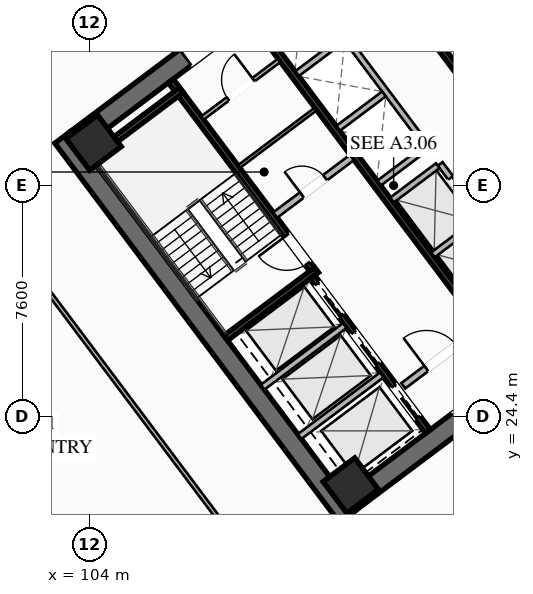
"""IFC4 building model, lengths in metres.
Left out: names, types, materials, properties, quantities, classifications, styles, units other than length and angle.
Written with IfcOpenShell. Run it as: python <this file> out.ifc"""

import sys

from ifc_helpers import new_model, si_unit, direction, frame, frame_2d, origin, origin_2d, place, context, subcontext, project, spatial, rectangle, hollow_rectangle, extrude, element, fill, save


model = new_model("IFC4")
c1 = context("Model", 3, precision=1e-05, world=origin(), true_north=direction((0.0, 1.0)))
c2 = subcontext(c1, "Body", "Model", "MODEL_VIEW")
j1 = project(units=[si_unit("LENGTHUNIT", "METRE"), si_unit("PLANEANGLEUNIT", "RADIAN")], contexts=[c1])
p1 = place(None, origin())
s1 = spatial("IfcSite", under=j1, at=p1, CompositionType="ELEMENT")
p2 = place(p1, origin())
s2 = spatial("IfcBuilding", under=s1, at=p2, CompositionType="ELEMENT")
p3 = place(p2, frame((0.0, 0.0, 70.75)))
s3 = spatial("IfcBuildingStorey", under=s2, at=p3, CompositionType="ELEMENT", Elevation=70.75)
for number, where, z_axis, x_axis in (
    (1, (112.476, 21.107, 0.0), (0.0, 0.0, 1.0), (-0.6, 0.8, 0.0)),
    (2, (115.524, 42.893, 0.0), (0.0, 0.0, 1.0), (0.6, -0.8, 0.0)),
):
    element("IfcWall", number, at=place(p3, frame(where, z_axis=z_axis, x_axis=x_axis)), inside=s3, PredefinedType="SHEAR", context=c2, shape_type="SweptSolid", body=[
        extrude(rectangle(XDim=15.6, YDim=0.65, at=frame_2d((7.8, 0.0))), origin(), (0.0, 0.0, 1.0), 3.55),
    ])
p4 = place(p3, frame((124.429, 30.478, 0.0), z_axis=(0.0, 0.0, 1.0), x_axis=(-0.799998028465, -0.600002628705, 0.0)))
e3 = element("IfcWall", 3, at=p4, inside=s3, PredefinedType="SHEAR", context=c2, shape_type="SweptSolid", body=[
    extrude(rectangle(XDim=14.86, YDim=0.65, at=frame_2d((7.43, 0.0))), origin(), (0.0, 0.0, 1.0), 3.55),
])
p5 = place(p4, frame((9.13, 0.0, 0.0)))
e4 = element("IfcOpeningElement", 4, at=p5, cuts=e3, PredefinedType="OPENING", context=c2, shape_type="SweptSolid", body=[
    extrude(rectangle(XDim=1.25, YDim=2.25, at=frame_2d((0.625, 1.125))), frame((0.0, 0.335, 0.0), z_axis=(0.0, -1.0, 0.0), x_axis=(1.0, 0.0, 0.0)), (0.0, 0.0, 1.0), 0.67),
])
p6 = place(p4, frame((4.08, 0.0, 0.0)))
e5 = element("IfcOpeningElement", 5, at=p6, cuts=e3, PredefinedType="OPENING", context=c2, shape_type="SweptSolid", body=[
    extrude(rectangle(XDim=1.25, YDim=2.25, at=frame_2d((0.625, 1.125))), frame((0.0, 0.335, 0.0), z_axis=(0.0, -1.0, 0.0), x_axis=(1.0, 0.0, 0.0)), (0.0, 0.0, 1.0), 0.67),
])
p7 = place(p3, frame((103.571, 33.522, 0.0), z_axis=(0.0, 0.0, 1.0), x_axis=(0.799998028465, 0.600002628705, 0.0)))
e6 = element("IfcWall", 6, at=p7, inside=s3, PredefinedType="SHEAR", context=c2, shape_type="SweptSolid", body=[
    extrude(rectangle(XDim=14.86, YDim=0.65, at=frame_2d((7.43, 0.0))), origin(), (0.0, 0.0, 1.0), 3.55),
])
p8 = place(p7, frame((4.48, 0.0, 0.0)))
e7 = element("IfcOpeningElement", 7, at=p8, cuts=e6, PredefinedType="OPENING", context=c2, shape_type="SweptSolid", body=[
    extrude(rectangle(XDim=1.25, YDim=2.25, at=frame_2d((0.625, 1.125))), frame((0.0, 0.335, 0.0), z_axis=(0.0, -1.0, 0.0), x_axis=(1.0, 0.0, 0.0)), (0.0, 0.0, 1.0), 0.67),
])
p9 = place(p7, frame((9.53, 0.0, 0.0)))
e8 = element("IfcOpeningElement", 8, at=p9, cuts=e6, PredefinedType="OPENING", context=c2, shape_type="SweptSolid", body=[
    extrude(rectangle(XDim=1.25, YDim=2.25, at=frame_2d((0.625, 1.125))), frame((0.0, 0.335, 0.0), z_axis=(0.0, -1.0, 0.0), x_axis=(1.0, 0.0, 0.0)), (0.0, 0.0, 1.0), 0.67),
])
for number, where, z_axis, x_axis in (
    (9, (112.59, 22.13, 0.0), (0.0, 0.0, 1.0), (0.8, 0.6, 0.0)),
    (10, (104.13, 33.41, 0.0), (0.0, 0.0, 1.0), (0.8, 0.6, 0.0)),
):
    element("IfcColumn", number, at=place(p3, frame(where, z_axis=z_axis, x_axis=x_axis)), inside=s3, PredefinedType="COLUMN", context=c2, shape_type="SweptSolid", body=[
        extrude(hollow_rectangle(XDim=1.3, YDim=1.3, WallThickness=0.05, at=origin_2d()), origin(), (0.0, 0.0, 1.0), 3.35),
    ])
p10 = place(p3, frame((111.44, 29.08, 0.0), z_axis=(0.0, 0.0, 1.0), x_axis=(-0.600009827119, 0.799992629566, 0.0)))
e11 = element("IfcWall", 11, at=p10, inside=s3, PredefinedType="SHEAR", context=c2, shape_type="SweptSolid", body=[
    extrude(rectangle(XDim=7.95, YDim=0.2, at=frame_2d((3.975, 0.0))), origin(), (0.0, 0.0, 1.0), 3.35),
])
p11 = place(p10, frame((0.45, 0.0, 0.0)))
e12 = element("IfcOpeningElement", 12, at=p11, cuts=e11, PredefinedType="OPENING", context=c2, shape_type="SweptSolid", body=[
    extrude(rectangle(XDim=1.15, YDim=2.2, at=frame_2d((0.575, 1.1))), frame((0.0, 0.11, 0.0), z_axis=(0.0, -1.0, 0.0), x_axis=(1.0, 0.0, 0.0)), (0.0, 0.0, 1.0), 0.22),
])
for number, where, z_axis, x_axis in (
    (13, (108.476, 26.982, 0.0), (0.0, 0.0, 1.0), (0.8, 0.6, 0.0)),
    (14, (104.036, 32.902, 0.0), (0.0, 0.0, 1.0), (0.8, 0.6, 0.0)),
):
    element("IfcWall", number, at=place(p3, frame(where, z_axis=z_axis, x_axis=x_axis)), inside=s3, PredefinedType="SHEAR", context=c2, shape_type="SweptSolid", body=[
        extrude(rectangle(XDim=3.73, YDim=0.2, at=frame_2d((1.865, 0.0))), origin(), (0.0, 0.0, 1.0), 3.35),
    ])
p12 = place(p3, frame((117.938, 26.016, 0.0), z_axis=(0.0, 0.0, 1.0), x_axis=(-0.600005463273, 0.799995902516, 0.0)))
e15 = element("IfcWall", 15, at=p12, inside=s3, PredefinedType="SHEAR", context=c2, shape_type="SweptSolid", body=[
    extrude(rectangle(XDim=14.3, YDim=0.2, at=frame_2d((7.15, 0.0))), origin(), (0.0, 0.0, 1.0), 3.35),
])
p13 = place(p3, frame((110.104, 31.028, 0.0), z_axis=(0.0, 0.0, 1.0), x_axis=(0.800018601094, 0.59997519774, 0.0)))
e16 = element("IfcWall", 16, at=p13, inside=s3, PredefinedType="SOLIDWALL", context=c2, shape_type="SweptSolid", body=[
    extrude(rectangle(XDim=3.15, YDim=0.22, at=frame_2d((1.575, 0.0))), origin(), (0.0, 0.0, 1.0), 2.703),
])
p14 = place(p13, frame((1.1, 0.0, 0.0)))
e17 = element("IfcOpeningElement", 17, at=p14, cuts=e16, PredefinedType="OPENING", context=c2, shape_type="SweptSolid", body=[
    extrude(rectangle(XDim=0.95, YDim=2.05, at=frame_2d((0.475, 1.025))), frame((0.0, 0.12, 0.0), z_axis=(0.0, -1.0, 0.0), x_axis=(1.0, 0.0, 0.0)), (0.0, 0.0, 1.0), 0.24),
])
p15 = place(p3, frame((114.316, 25.412, 0.0), z_axis=(0.0, 0.0, 1.0), x_axis=(0.800018601094, 0.59997519774, 0.0)))
e18 = element("IfcWall", 18, at=p15, inside=s3, PredefinedType="SOLIDWALL", context=c2, shape_type="SweptSolid", body=[
    extrude(rectangle(XDim=3.15, YDim=0.22, at=frame_2d((1.575, 0.0))), origin(), (0.0, 0.0, 1.0), 2.703),
])
p16 = place(p15, frame((0.95, 0.0, 0.0)))
e19 = element("IfcOpeningElement", 19, at=p16, cuts=e18, PredefinedType="OPENING", context=c2, shape_type="SweptSolid", body=[
    extrude(rectangle(XDim=1.25, YDim=2.25, at=frame_2d((0.625, 1.125))), frame((0.0, 0.12, 0.0), z_axis=(0.0, -1.0, 0.0), x_axis=(1.0, 0.0, 0.0)), (0.0, 0.0, 1.0), 0.24),
])
p17 = place(p3, frame((115.13, 23.91, 0.0), z_axis=(0.0, 0.0, 1.0), x_axis=(-0.599975393228, 0.800018454488, 0.0)))
e20 = element("IfcWall", 20, at=p17, inside=s3, PredefinedType="SHEAR", context=c2, shape_type="SweptSolid", body=[
    extrude(rectangle(XDim=6.35, YDim=0.2, at=frame_2d((3.175, 0.0))), origin(), (0.0, 0.0, 1.0), 3.35),
])
p18 = place(p17, frame((4.775, 0.0, 0.0)))
e21 = element("IfcOpeningElement", 21, at=p18, cuts=e20, PredefinedType="OPENING", context=c2, shape_type="SweptSolid", body=[
    extrude(rectangle(XDim=1.3, YDim=2.25, at=frame_2d((0.65, 1.125))), frame((0.0, 0.11, 0.0), z_axis=(0.0, -1.0, 0.0), x_axis=(1.0, 0.0, 0.0)), (0.0, 0.0, 1.0), 0.22),
])
p19 = place(p17, frame((2.775, 0.0, 0.0)))
e22 = element("IfcOpeningElement", 22, at=p19, cuts=e20, PredefinedType="OPENING", context=c2, shape_type="SweptSolid", body=[
    extrude(rectangle(XDim=1.3, YDim=2.25, at=frame_2d((0.65, 1.125))), frame((0.0, 0.11, 0.0), z_axis=(0.0, -1.0, 0.0), x_axis=(1.0, 0.0, 0.0)), (0.0, 0.0, 1.0), 0.22),
])
p20 = place(p17, frame((0.575, 0.0, 0.0)))
e23 = element("IfcOpeningElement", 23, at=p20, cuts=e20, PredefinedType="OPENING", context=c2, shape_type="SweptSolid", body=[
    extrude(rectangle(XDim=1.3, YDim=2.25, at=frame_2d((0.65, 1.125))), frame((0.0, 0.11, 0.0), z_axis=(0.0, -1.0, 0.0), x_axis=(1.0, 0.0, 0.0)), (0.0, 0.0, 1.0), 0.22),
])
for number, where, z_axis, x_axis in (
    (24, (110.906, 23.742, 0.0), (0.0, 0.0, 1.0), (0.8, 0.6, 0.0)),
    (25, (109.688, 25.366, 0.0), (0.0, 0.0, 1.0), (0.8, 0.6, 0.0)),
):
    element("IfcWall", number, at=place(p3, frame(where, z_axis=z_axis, x_axis=x_axis)), inside=s3, PredefinedType="SOLIDWALL", context=c2, shape_type="SweptSolid", body=[
        extrude(rectangle(XDim=3.38, YDim=0.2, at=frame_2d((1.69, 0.0))), origin(), (0.0, 0.0, 1.0), 3.35),
    ])
p21 = place(p3, frame((112.87, 40.09, 0.0), z_axis=(0.0, 0.0, 1.0), x_axis=(0.599975393228, -0.800018454488, 0.0)))
e26 = element("IfcWall", 26, at=p21, inside=s3, PredefinedType="SHEAR", context=c2, shape_type="SweptSolid", body=[
    extrude(rectangle(XDim=6.35, YDim=0.2, at=frame_2d((3.175, 0.0))), origin(), (0.0, 0.0, 1.0), 3.35),
])
p22 = place(p3, frame((107.71, 34.22, 0.0), z_axis=(0.0, 0.0, 1.0), x_axis=(0.799981399002, 0.60002480053, 0.0)))
e27 = element("IfcWall", 27, at=p22, inside=s3, PredefinedType="PARTITIONING", context=c2, shape_type="SweptSolid", body=[
    extrude(rectangle(XDim=3.15, YDim=0.135, at=frame_2d((1.575, 0.0))), origin(), (0.0, 0.0, 1.0), 2.703),
])
p23 = place(p22, frame((1.05, 0.0, 0.0)))
e28 = element("IfcOpeningElement", 28, at=p23, cuts=e27, PredefinedType="OPENING", context=c2, shape_type="SweptSolid", body=[
    extrude(rectangle(XDim=1.05, YDim=2.2, at=frame_2d((0.525, 1.1))), frame((0.0, 0.077, 0.0), z_axis=(0.0, -1.0, 0.0), x_axis=(1.0, 0.0, 0.0)), (0.0, 0.0, 1.0), 0.155),
])
p24 = place(p3, frame((108.91, 32.62, 0.0), z_axis=(0.0, 0.0, 1.0), x_axis=(0.800018601094, 0.59997519774, 0.0)))
e29 = element("IfcWall", 29, at=p24, inside=s3, PredefinedType="PARTITIONING", context=c2, shape_type="SweptSolid", body=[
    extrude(rectangle(XDim=3.15, YDim=0.11, at=frame_2d((1.575, 0.0))), origin(), (0.0, 0.0, 1.0), 2.703),
])
p25 = place(p3, frame((119.61, 27.27, 0.0), z_axis=(0.0, 0.0, 1.0), x_axis=(-0.600011488909, 0.79999138319, 0.0)))
e30 = element("IfcWall", 30, at=p25, inside=s3, PredefinedType="SOLIDWALL", context=c2, shape_type="SweptSolid", body=[
    extrude(rectangle(XDim=6.8, YDim=0.2, at=frame_2d((3.4, 0.0))), origin(), (0.0, 0.0, 1.0), 3.35),
])
p26 = place(p25, frame((0.625, 0.0, 0.0)))
e31 = element("IfcOpeningElement", 31, at=p26, cuts=e30, PredefinedType="OPENING", context=c2, shape_type="SweptSolid", body=[
    extrude(rectangle(XDim=1.1, YDim=2.2, at=frame_2d((0.55, 1.1))), frame((0.0, 0.11, 0.0), z_axis=(0.0, -1.0, 0.0), x_axis=(1.0, 0.0, 0.0)), (0.0, 0.0, 1.0), 0.22),
])
p27 = place(p25, frame((2.875, 0.0, 0.0)))
e32 = element("IfcOpeningElement", 32, at=p27, cuts=e30, PredefinedType="OPENING", context=c2, shape_type="SweptSolid", body=[
    extrude(rectangle(XDim=1.1, YDim=2.2, at=frame_2d((0.55, 1.1))), frame((0.0, 0.11, 0.0), z_axis=(0.0, -1.0, 0.0), x_axis=(1.0, 0.0, 0.0)), (0.0, 0.0, 1.0), 0.22),
])
p28 = place(p25, frame((5.125, 0.0, 0.0)))
e33 = element("IfcOpeningElement", 33, at=p28, cuts=e30, PredefinedType="OPENING", context=c2, shape_type="SweptSolid", body=[
    extrude(rectangle(XDim=1.1, YDim=2.2, at=frame_2d((0.55, 1.1))), frame((0.0, 0.11, 0.0), z_axis=(0.0, -1.0, 0.0), x_axis=(1.0, 0.0, 0.0)), (0.0, 0.0, 1.0), 0.22),
])
p29 = place(p3, frame((115.296, 29.722, 0.0), z_axis=(0.0, 0.0, 1.0), x_axis=(0.799984418148, 0.600020775241, 0.0)))
e34 = element("IfcWall", 34, at=p29, inside=s3, PredefinedType="SOLIDWALL", context=c2, shape_type="SweptSolid", body=[
    extrude(rectangle(XDim=1.88, YDim=0.2, at=frame_2d((0.94, 0.0))), origin(), (0.0, 0.0, 1.0), 3.35),
])
p30 = place(p3, frame((113.946, 31.522, 0.0), z_axis=(0.0, 0.0, 1.0), x_axis=(0.8, 0.6, 0.0)))
e35 = element("IfcWall", 35, at=p30, inside=s3, PredefinedType="SOLIDWALL", context=c2, shape_type="SweptSolid", body=[
    extrude(rectangle(XDim=1.88, YDim=0.2, at=frame_2d((0.94, 0.0))), origin(), (0.0, 0.0, 1.0), 3.35),
])
p31 = place(p3, frame((115.11, 33.27, 0.0), z_axis=(0.0, 0.0, 1.0), x_axis=(-0.600011488909, 0.79999138319, 0.0)))
e36 = element("IfcWall", 36, at=p31, inside=s3, PredefinedType="SOLIDWALL", context=c2, shape_type="SweptSolid", body=[
    extrude(rectangle(XDim=6.8, YDim=0.2, at=frame_2d((3.4, 0.0))), origin(), (0.0, 0.0, 1.0), 3.35),
])
p32 = place(p3, frame((113.526, 32.082, 0.0), z_axis=(0.0, 0.0, 1.0), x_axis=(0.800046745961, 0.599937666993, 0.0)))
e37 = element("IfcWall", 37, at=p32, inside=s3, PredefinedType="SOLIDWALL", context=c2, shape_type="SweptSolid", body=[
    extrude(rectangle(XDim=1.88, YDim=0.2, at=frame_2d((0.94, 0.0))), origin(), (0.0, 0.0, 1.0), 3.35),
])
p33 = place(p3, frame((112.176, 33.882, 0.0), z_axis=(0.0, 0.0, 1.0), x_axis=(0.8, 0.6, 0.0)))
e38 = element("IfcWall", 38, at=p33, inside=s3, PredefinedType="SOLIDWALL", context=c2, shape_type="SweptSolid", body=[
    extrude(rectangle(XDim=1.88, YDim=0.2, at=frame_2d((0.94, 0.0))), origin(), (0.0, 0.0, 1.0), 3.35),
])
p34 = place(p3, frame((110.826, 35.682, 0.0), z_axis=(0.0, 0.0, 1.0), x_axis=(0.799984418148, 0.600020775241, 0.0)))
e39 = element("IfcWall", 39, at=p34, inside=s3, PredefinedType="SOLIDWALL", context=c2, shape_type="SweptSolid", body=[
    extrude(rectangle(XDim=1.88, YDim=0.2, at=frame_2d((0.94, 0.0))), origin(), (0.0, 0.0, 1.0), 3.35),
])
p35 = place(p3, frame((98.516, 34.012, 0.0), z_axis=(0.0, 0.0, 1.0), x_axis=(0.8, 0.6, 0.0)))
e40 = element("IfcWall", 40, at=p35, inside=s3, PredefinedType="PARTITIONING", context=c2, shape_type="SweptSolid", body=[
    extrude(rectangle(XDim=28.23, YDim=0.135, at=frame_2d((14.115, 0.0))), origin(), (0.0, 0.0, 1.0), 2.703),
])
p36 = place(p35, frame((0.3, 0.0, 0.0)))
e41 = element("IfcOpeningElement", 41, at=p36, cuts=e40, PredefinedType="OPENING", context=c2, shape_type="SweptSolid", body=[
    extrude(rectangle(XDim=0.95, YDim=2.05, at=frame_2d((0.475, 1.025))), frame((0.0, 0.077, 0.0), z_axis=(0.0, -1.0, 0.0), x_axis=(1.0, 0.0, 0.0)), (0.0, 0.0, 1.0), 0.155),
])
p37 = place(p35, frame((6.84, 0.0, 0.0)))
e42 = element("IfcOpeningElement", 42, at=p37, cuts=e40, PredefinedType="OPENING", context=c2, shape_type="SweptSolid", body=[
    extrude(rectangle(XDim=0.95, YDim=2.05, at=frame_2d((0.475, 1.025))), frame((0.0, 0.077, 0.0), z_axis=(0.0, -1.0, 0.0), x_axis=(1.0, 0.0, 0.0)), (0.0, 0.0, 1.0), 0.155),
])
p38 = place(p35, frame((10.863, 0.0, 0.0)))
e43 = element("IfcOpeningElement", 43, at=p38, cuts=e40, PredefinedType="OPENING", context=c2, shape_type="SweptSolid", body=[
    extrude(rectangle(XDim=0.95, YDim=2.05, at=frame_2d((0.475, 1.025))), frame((0.0, 0.077, 0.0), z_axis=(0.0, -1.0, 0.0), x_axis=(1.0, 0.0, 0.0)), (0.0, 0.0, 1.0), 0.155),
])
p39 = place(p35, frame((26.98, 0.0, 0.0)))
e44 = element("IfcOpeningElement", 44, at=p39, cuts=e40, PredefinedType="OPENING", context=c2, shape_type="SweptSolid", body=[
    extrude(rectangle(XDim=0.95, YDim=2.05, at=frame_2d((0.475, 1.025))), frame((0.0, 0.077, 0.0), z_axis=(0.0, -1.0, 0.0), x_axis=(1.0, 0.0, 0.0)), (0.0, 0.0, 1.0), 0.155),
])
p40 = place(p3, frame((134.18, 33.51, 0.0), z_axis=(0.0, 0.0, 1.0), x_axis=(-0.8, -0.6, 0.0)))
e45 = element("IfcWall", 45, at=p40, inside=s3, PredefinedType="PARTITIONING", context=c2, shape_type="SweptSolid", body=[
    extrude(rectangle(XDim=28.23, YDim=0.135, at=frame_2d((14.115, 0.0))), origin(), (0.0, 0.0, 1.0), 2.703),
])
p41 = place(p40, frame((26.9, 0.0, 0.0)))
e46 = element("IfcOpeningElement", 46, at=p41, cuts=e45, PredefinedType="OPENING", context=c2, shape_type="SweptSolid", body=[
    extrude(rectangle(XDim=0.95, YDim=2.05, at=frame_2d((0.475, 1.025))), frame((0.0, 0.077, 0.0), z_axis=(0.0, -1.0, 0.0), x_axis=(1.0, 0.0, 0.0)), (0.0, 0.0, 1.0), 0.155),
])
p42 = place(p40, frame((20.399, 0.0, 0.0)))
e47 = element("IfcOpeningElement", 47, at=p42, cuts=e45, PredefinedType="OPENING", context=c2, shape_type="SweptSolid", body=[
    extrude(rectangle(XDim=0.95, YDim=2.05, at=frame_2d((0.475, 1.025))), frame((0.0, 0.077, 0.0), z_axis=(0.0, -1.0, 0.0), x_axis=(1.0, 0.0, 0.0)), (0.0, 0.0, 1.0), 0.155),
])
p43 = place(p40, frame((16.339, 0.0, 0.0)))
e48 = element("IfcOpeningElement", 48, at=p43, cuts=e45, PredefinedType="OPENING", context=c2, shape_type="SweptSolid", body=[
    extrude(rectangle(XDim=0.95, YDim=2.05, at=frame_2d((0.475, 1.025))), frame((0.0, 0.077, 0.0), z_axis=(0.0, -1.0, 0.0), x_axis=(1.0, 0.0, 0.0)), (0.0, 0.0, 1.0), 0.155),
])
p44 = place(p40, frame((0.38, 0.0, 0.0)))
e49 = element("IfcOpeningElement", 49, at=p44, cuts=e45, PredefinedType="OPENING", context=c2, shape_type="SweptSolid", body=[
    extrude(rectangle(XDim=0.95, YDim=2.05, at=frame_2d((0.475, 1.025))), frame((0.0, 0.077, 0.0), z_axis=(0.0, -1.0, 0.0), x_axis=(1.0, 0.0, 0.0)), (0.0, 0.0, 1.0), 0.155),
])
p45 = place(p3, frame((111.548, 16.636, 0.0), z_axis=(0.0, 0.0, 1.0), x_axis=(-0.600003610192, 0.799997292343, 0.0)))
e50 = element("IfcWall", 50, at=p45, inside=s3, PredefinedType="PARTITIONING", context=c2, shape_type="SweptSolid", body=[
    extrude(rectangle(XDim=21.64, YDim=0.135, at=frame_2d((10.82, 0.0))), origin(), (0.0, 0.0, 1.0), 2.703),
])
p46 = place(p45, frame((0.3, 0.0, 0.0)))
e51 = element("IfcOpeningElement", 51, at=p46, cuts=e50, PredefinedType="OPENING", context=c2, shape_type="SweptSolid", body=[
    extrude(rectangle(XDim=0.95, YDim=2.05, at=frame_2d((0.475, 1.025))), frame((0.0, 0.077, 0.0), z_axis=(0.0, -1.0, 0.0), x_axis=(1.0, 0.0, 0.0)), (0.0, 0.0, 1.0), 0.155),
])
p47 = place(p8, origin())
e52 = element("IfcDoor", 52, at=p47, inside=s3, OperationType="SINGLE_SWING_LEFT", PredefinedType="DOOR", context=c2, shape_type="SweptSolid", body=[
    extrude(rectangle(XDim=1.25, YDim=2.25, at=frame_2d((0.625, 1.125))), frame((0.0, 0.025, 0.0), z_axis=(0.0, -1.0, 0.0), x_axis=(1.0, 0.0, 0.0)), (0.0, 0.0, 1.0), 0.05),
])
fill(e7, e52)
p48 = place(p11, origin())
e53 = element("IfcDoor", 53, at=p48, inside=s3, OperationType="SINGLE_SWING_RIGHT", PredefinedType="DOOR", context=c2, shape_type="SweptSolid", body=[
    extrude(rectangle(XDim=1.15, YDim=2.2, at=frame_2d((0.575, 1.1))), frame((0.0, 0.025, 0.0), z_axis=(0.0, -1.0, 0.0), x_axis=(1.0, 0.0, 0.0)), (0.0, 0.0, 1.0), 0.05),
])
fill(e12, e53)
p49 = place(p16, origin())
e54 = element("IfcDoor", 54, at=p49, inside=s3, OperationType="SINGLE_SWING_LEFT", PredefinedType="DOOR", context=c2, shape_type="SweptSolid", body=[
    extrude(rectangle(XDim=1.25, YDim=2.25, at=frame_2d((0.625, 1.125))), frame((0.0, 0.025, 0.0), z_axis=(0.0, -1.0, 0.0), x_axis=(1.0, 0.0, 0.0)), (0.0, 0.0, 1.0), 0.05),
])
fill(e19, e54)
p50 = place(p23, origin())
e55 = element("IfcDoor", 55, at=p50, inside=s3, OperationType="SINGLE_SWING_RIGHT", PredefinedType="DOOR", context=c2, shape_type="SweptSolid", body=[
    extrude(rectangle(XDim=1.05, YDim=2.2, at=frame_2d((0.525, 1.1))), frame((0.0, 0.025, 0.0), z_axis=(0.0, -1.0, 0.0), x_axis=(1.0, 0.0, 0.0)), (0.0, 0.0, 1.0), 0.05),
])
fill(e28, e55)
p51 = place(p14, origin())
e56 = element("IfcDoor", 56, at=p51, inside=s3, OperationType="SINGLE_SWING_LEFT", PredefinedType="DOOR", context=c2, shape_type="SweptSolid", body=[
    extrude(rectangle(XDim=0.95, YDim=2.05, at=frame_2d((0.475, 1.025))), frame((0.0, 0.025, 0.0), z_axis=(0.0, -1.0, 0.0), x_axis=(1.0, 0.0, 0.0)), (0.0, 0.0, 1.0), 0.05),
])
fill(e17, e56)
p52 = place(p18, origin())
e57 = element("IfcDoor", 57, at=p52, inside=s3, OperationType="SLIDING_TO_LEFT", PredefinedType="DOOR", context=c2, shape_type="SweptSolid", body=[
    extrude(rectangle(XDim=1.3, YDim=2.25, at=frame_2d((0.65, 1.125))), frame((0.0, 0.025, 0.0), z_axis=(0.0, -1.0, 0.0), x_axis=(1.0, 0.0, 0.0)), (0.0, 0.0, 1.0), 0.05),
])
fill(e21, e57)
p53 = place(p19, origin())
e58 = element("IfcDoor", 58, at=p53, inside=s3, OperationType="SLIDING_TO_LEFT", PredefinedType="DOOR", context=c2, shape_type="SweptSolid", body=[
    extrude(rectangle(XDim=1.3, YDim=2.25, at=frame_2d((0.65, 1.125))), frame((0.0, 0.025, 0.0), z_axis=(0.0, -1.0, 0.0), x_axis=(1.0, 0.0, 0.0)), (0.0, 0.0, 1.0), 0.05),
])
fill(e22, e58)
p54 = place(p20, origin())
e59 = element("IfcDoor", 59, at=p54, inside=s3, OperationType="SLIDING_TO_LEFT", PredefinedType="DOOR", context=c2, shape_type="SweptSolid", body=[
    extrude(rectangle(XDim=1.3, YDim=2.25, at=frame_2d((0.65, 1.125))), frame((0.0, 0.025, 0.0), z_axis=(0.0, -1.0, 0.0), x_axis=(1.0, 0.0, 0.0)), (0.0, 0.0, 1.0), 0.05),
])
fill(e23, e59)
p55 = place(p28, origin())
e60 = element("IfcDoor", 60, at=p55, inside=s3, OperationType="SLIDING_TO_LEFT", PredefinedType="DOOR", context=c2, shape_type="SweptSolid", body=[
    extrude(rectangle(XDim=1.1, YDim=2.2, at=frame_2d((0.55, 1.1))), frame((0.0, 0.025, 0.0), z_axis=(0.0, -1.0, 0.0), x_axis=(1.0, 0.0, 0.0)), (0.0, 0.0, 1.0), 0.05),
])
fill(e33, e60)
save(model, sys.argv[1])
